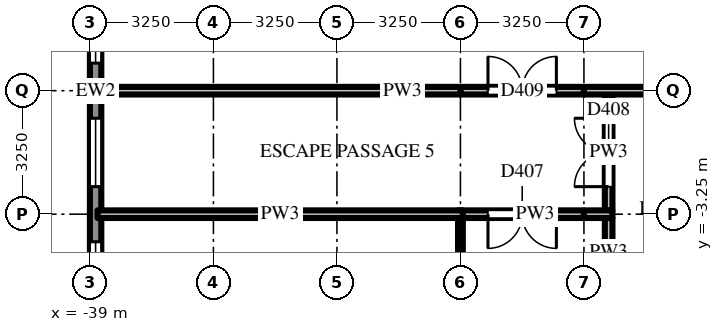
"""IFC4 building model, lengths in metres.
Left out: names, types, materials, properties, quantities, classifications, styles, units other than length and angle.
Written with IfcOpenShell. Run it as: python <this file> out.ifc"""

import sys

from ifc_helpers import new_model, si_unit, direction, frame, frame_2d, origin, place, context, subcontext, project, spatial, rectangle, extrude, source, transform, mapped, element, fill, save


model = new_model("IFC4")
c1 = context("Model", 3, precision=1e-05, world=origin(), true_north=direction((0.0, 1.0)))
c2 = subcontext(c1, "Body", "Model", "MODEL_VIEW")
j1 = project(units=[si_unit("LENGTHUNIT", "METRE"), si_unit("PLANEANGLEUNIT", "RADIAN")], contexts=[c1])
p1 = place(None, origin())
s1 = spatial("IfcSite", under=j1, at=p1, CompositionType="ELEMENT")
p2 = place(p1, origin())
s2 = spatial("IfcBuilding", under=s1, at=p2, CompositionType="ELEMENT")
p3 = place(p2, frame((0.0, 0.0, 14.0)))
s3 = spatial("IfcBuildingStorey", under=s2, at=p3, CompositionType="ELEMENT", Elevation=14.0)
m1 = source(origin(), c2, "Body", "SweptSolid", [
    extrude(rectangle(XDim=71.5, YDim=0.3, at=frame_2d((35.75, 0.0))), origin(), (0.0, 0.0, 1.0), 4.7),
])
p4 = place(p3, frame((-38.85, 35.75, 0.0), z_axis=(0.0, 0.0, 1.0), x_axis=(0.0, -1.0, 0.0)))
e1 = element("IfcWall", 1, at=p4, inside=s3, PredefinedType="SOLIDWALL", context=c2, shape_type="MappedRepresentation", body=[
    mapped(m1, transform((0.0, 0.0, 0.0))),
])
m2 = source(origin(), c2, "Body", "SweptSolid", [
    extrude(rectangle(XDim=1.8, YDim=3.0, at=frame_2d((0.9, 1.5))), frame((0.0, 0.16, 0.0), z_axis=(0.0, -1.0, 0.0), x_axis=(1.0, 0.0, 0.0)), (0.0, 0.0, 1.0), 0.32),
])
p5 = place(p4, frame((0.725, 0.0, 0.9)))
e2 = element("IfcOpeningElement", 2, at=p5, cuts=e1, PredefinedType="OPENING", context=c2, shape_type="MappedRepresentation", body=[
    mapped(m2, transform((0.0, 0.0, 0.0))),
])
p6 = place(p4, frame((3.975, 0.0, 0.9)))
e3 = element("IfcOpeningElement", 3, at=p6, cuts=e1, PredefinedType="OPENING", context=c2, shape_type="MappedRepresentation", body=[
    mapped(m2, transform((0.0, 0.0, 0.0))),
])
p7 = place(p4, frame((7.225, 0.0, 0.9)))
e4 = element("IfcOpeningElement", 4, at=p7, cuts=e1, PredefinedType="OPENING", context=c2, shape_type="MappedRepresentation", body=[
    mapped(m2, transform((0.0, 0.0, 0.0))),
])
p8 = place(p4, frame((10.475, 0.0, 0.9)))
e5 = element("IfcOpeningElement", 5, at=p8, cuts=e1, PredefinedType="OPENING", context=c2, shape_type="MappedRepresentation", body=[
    mapped(m2, transform((0.0, 0.0, 0.0))),
])
p9 = place(p4, frame((13.725, 0.0, 0.9)))
e6 = element("IfcOpeningElement", 6, at=p9, cuts=e1, PredefinedType="OPENING", context=c2, shape_type="MappedRepresentation", body=[
    mapped(m2, transform((0.0, 0.0, 0.0))),
])
p10 = place(p4, frame((16.975, 0.0, 0.9)))
e7 = element("IfcOpeningElement", 7, at=p10, cuts=e1, PredefinedType="OPENING", context=c2, shape_type="MappedRepresentation", body=[
    mapped(m2, transform((0.0, 0.0, 0.0))),
])
p11 = place(p4, frame((20.225, 0.0, 0.9)))
e8 = element("IfcOpeningElement", 8, at=p11, cuts=e1, PredefinedType="OPENING", context=c2, shape_type="MappedRepresentation", body=[
    mapped(m2, transform((0.0, 0.0, 0.0))),
])
p12 = place(p4, frame((23.475, 0.0, 0.9)))
e9 = element("IfcOpeningElement", 9, at=p12, cuts=e1, PredefinedType="OPENING", context=c2, shape_type="MappedRepresentation", body=[
    mapped(m2, transform((0.0, 0.0, 0.0))),
])
p13 = place(p4, frame((26.725, 0.0, 0.9)))
e10 = element("IfcOpeningElement", 10, at=p13, cuts=e1, PredefinedType="OPENING", context=c2, shape_type="MappedRepresentation", body=[
    mapped(m2, transform((0.0, 0.0, 0.0))),
])
p14 = place(p4, frame((29.975, 0.0, 0.9)))
e11 = element("IfcOpeningElement", 11, at=p14, cuts=e1, PredefinedType="OPENING", context=c2, shape_type="MappedRepresentation", body=[
    mapped(m2, transform((0.0, 0.0, 0.0))),
])
p15 = place(p4, frame((33.225, 0.0, 0.9)))
e12 = element("IfcOpeningElement", 12, at=p15, cuts=e1, PredefinedType="OPENING", context=c2, shape_type="MappedRepresentation", body=[
    mapped(m2, transform((0.0, 0.0, 0.0))),
])
p16 = place(p4, frame((36.475, 0.0, 0.9)))
e13 = element("IfcOpeningElement", 13, at=p16, cuts=e1, PredefinedType="OPENING", context=c2, shape_type="MappedRepresentation", body=[
    mapped(m2, transform((0.0, 0.0, 0.0))),
])
p17 = place(p4, frame((39.725, 0.0, 0.9)))
e14 = element("IfcOpeningElement", 14, at=p17, cuts=e1, PredefinedType="OPENING", context=c2, shape_type="MappedRepresentation", body=[
    mapped(m2, transform((0.0, 0.0, 0.0))),
])
p18 = place(p4, frame((42.975, 0.0, 0.9)))
e15 = element("IfcOpeningElement", 15, at=p18, cuts=e1, PredefinedType="OPENING", context=c2, shape_type="MappedRepresentation", body=[
    mapped(m2, transform((0.0, 0.0, 0.0))),
])
p19 = place(p4, frame((46.225, 0.0, 0.9)))
e16 = element("IfcOpeningElement", 16, at=p19, cuts=e1, PredefinedType="OPENING", context=c2, shape_type="MappedRepresentation", body=[
    mapped(m2, transform((0.0, 0.0, 0.0))),
])
m3 = source(origin(), c2, "Body", "SweptSolid", [
    extrude(rectangle(XDim=1.8, YDim=2.4, at=frame_2d((0.9, 1.2))), frame((0.0, 0.16, 0.0), z_axis=(0.0, -1.0, 0.0), x_axis=(1.0, 0.0, 0.0)), (0.0, 0.0, 1.0), 0.32),
])
p20 = place(p4, frame((49.475, 0.0, 0.0)))
e17 = element("IfcOpeningElement", 17, at=p20, cuts=e1, PredefinedType="OPENING", context=c2, shape_type="MappedRepresentation", body=[
    mapped(m3, transform((0.0, 0.0, 0.0))),
])
p21 = place(p4, frame((52.725, 0.0, 0.9)))
e18 = element("IfcOpeningElement", 18, at=p21, cuts=e1, PredefinedType="OPENING", context=c2, shape_type="MappedRepresentation", body=[
    mapped(m2, transform((0.0, 0.0, 0.0))),
])
p22 = place(p4, frame((55.975, 0.0, 0.9)))
e19 = element("IfcOpeningElement", 19, at=p22, cuts=e1, PredefinedType="OPENING", context=c2, shape_type="MappedRepresentation", body=[
    mapped(m2, transform((0.0, 0.0, 0.0))),
])
p23 = place(p4, frame((59.225, 0.0, 0.9)))
e20 = element("IfcOpeningElement", 20, at=p23, cuts=e1, PredefinedType="OPENING", context=c2, shape_type="MappedRepresentation", body=[
    mapped(m2, transform((0.0, 0.0, 0.0))),
])
p24 = place(p4, frame((62.475, 0.0, 0.9)))
e21 = element("IfcOpeningElement", 21, at=p24, cuts=e1, PredefinedType="OPENING", context=c2, shape_type="MappedRepresentation", body=[
    mapped(m2, transform((0.0, 0.0, 0.0))),
])
p25 = place(p4, frame((65.725, 0.0, 0.9)))
e22 = element("IfcOpeningElement", 22, at=p25, cuts=e1, PredefinedType="OPENING", context=c2, shape_type="MappedRepresentation", body=[
    mapped(m2, transform((0.0, 0.0, 0.0))),
])
p26 = place(p4, frame((68.975, 0.0, 0.9)))
e23 = element("IfcOpeningElement", 23, at=p26, cuts=e1, PredefinedType="OPENING", context=c2, shape_type="MappedRepresentation", body=[
    mapped(m2, transform((0.0, 0.0, 0.0))),
])
p27 = place(p3, frame((-29.25, -29.15, 0.0), z_axis=(0.0, 0.0, 1.0), x_axis=(0.0, 1.0, 0.0)))
e24 = element("IfcWall", 24, at=p27, inside=s3, PredefinedType="PARTITIONING", context=c2, shape_type="SweptSolid", body=[
    extrude(rectangle(XDim=25.8, YDim=0.125, at=frame_2d((12.9, 0.0))), origin(), (0.0, 0.0, 1.0), 3.762),
])
m4 = source(origin(), c2, "Body", "SweptSolid", [
    extrude(rectangle(XDim=1.8, YDim=2.1, at=frame_2d((0.9, 1.05))), frame((0.0, 0.073, 0.0), z_axis=(0.0, -1.0, 0.0), x_axis=(1.0, 0.0, 0.0)), (0.0, 0.0, 1.0), 0.145),
])
p28 = place(p27, frame((0.25, 0.0, 0.0)))
e25 = element("IfcOpeningElement", 25, at=p28, cuts=e24, PredefinedType="OPENING", context=c2, shape_type="MappedRepresentation", body=[
    mapped(m4, transform((0.0, 0.0, 0.0))),
])
m5 = source(origin(), c2, "Body", "SweptSolid", [
    extrude(rectangle(XDim=3.05, YDim=0.2, at=frame_2d((1.525, 0.0))), origin(), (0.0, 0.0, 1.0), 4.077),
])
p29 = place(p3, frame((-25.35, -3.15, 0.0), z_axis=(0.0, 0.0, 1.0), x_axis=(0.0, 1.0, 0.0)))
e26 = element("IfcWall", 26, at=p29, inside=s3, PredefinedType="PARTITIONING", context=c2, shape_type="MappedRepresentation", body=[
    mapped(m5, transform((0.0, 0.0, 0.0))),
])
m6 = source(origin(), c2, "Body", "SweptSolid", [
    extrude(rectangle(XDim=1.8, YDim=2.1, at=frame_2d((0.9, 1.05))), frame((0.0, 0.11, 0.0), z_axis=(0.0, -1.0, 0.0), x_axis=(1.0, 0.0, 0.0)), (0.0, 0.0, 1.0), 0.22),
])
p30 = place(p29, frame((0.625, 0.0, 0.0)))
e27 = element("IfcOpeningElement", 27, at=p30, cuts=e26, PredefinedType="OPENING", context=c2, shape_type="MappedRepresentation", body=[
    mapped(m6, transform((0.0, 0.0, 0.0))),
])
m7 = source(origin(), c2, "Body", "SweptSolid", [
    extrude(rectangle(XDim=1.8, YDim=0.2, at=frame_2d((0.9, 0.0))), origin(), (0.0, 0.0, 1.0), 4.7),
])
p31 = place(p3, frame((-25.35, -3.35, 0.0), z_axis=(0.0, 0.0, 1.0), x_axis=(0.0, -1.0, 0.0)))
e28 = element("IfcWall", 28, at=p31, inside=s3, PredefinedType="PARTITIONING", context=c2, shape_type="MappedRepresentation", body=[
    mapped(m7, transform((0.0, 0.0, 0.0))),
])
m8 = source(origin(), c2, "Body", "SweptSolid", [
    extrude(rectangle(XDim=3.312, YDim=0.2, at=frame_2d((1.656, 0.0))), origin(), (0.0, 0.0, 1.0), 4.7),
])
p32 = place(p3, frame((-26.0, -3.25, 0.0), z_axis=(0.0, 0.0, 1.0), x_axis=(-1.0, 0.0, 0.0)))
e29 = element("IfcWall", 29, at=p32, inside=s3, PredefinedType="PARTITIONING", context=c2, shape_type="MappedRepresentation", body=[
    mapped(m8, transform((0.0, 0.0, 0.0))),
])
p33 = place(p32, frame((0.725, 0.0, 0.0)))
e30 = element("IfcOpeningElement", 30, at=p33, cuts=e29, PredefinedType="OPENING", context=c2, shape_type="MappedRepresentation", body=[
    mapped(m6, transform((0.0, 0.0, 0.0))),
])
m9 = source(origin(), c2, "Body", "SweptSolid", [
    extrude(rectangle(XDim=9.613, YDim=0.2, at=frame_2d((4.806, 0.0))), origin(), (0.0, 0.0, 1.0), 3.918),
])
p34 = place(p3, frame((-29.188, -3.25, 0.0), z_axis=(0.0, 0.0, 1.0), x_axis=(-1.0, 0.0, 0.0)))
e31 = element("IfcWall", 31, at=p34, inside=s3, PredefinedType="PARTITIONING", context=c2, shape_type="MappedRepresentation", body=[
    mapped(m9, transform((0.0, 0.0, 0.0))),
])
m10 = source(origin(), c2, "Body", "SweptSolid", [
    extrude(rectangle(XDim=0.75, YDim=0.2, at=frame_2d((0.375, 0.0))), origin(), (0.0, 0.0, 1.0), 4.7),
])
p35 = place(p3, frame((-25.25, -3.25, 0.0), z_axis=(0.0, 0.0, 1.0), x_axis=(-1.0, 0.0, 0.0)))
e32 = element("IfcWall", 32, at=p35, inside=s3, PredefinedType="PARTITIONING", context=c2, shape_type="MappedRepresentation", body=[
    mapped(m10, transform((0.0, 0.0, 0.0))),
])
m11 = source(origin(), c2, "Body", "SweptSolid", [
    extrude(rectangle(XDim=3.25, YDim=0.2, at=frame_2d((1.625, 0.0))), origin(), (0.0, 0.0, 1.0), 4.077),
])
p36 = place(p3, frame((-29.25, 0.0, 0.0), z_axis=(0.0, 0.0, 1.0), x_axis=(1.0, 0.0, 0.0)))
e33 = element("IfcWall", 33, at=p36, inside=s3, PredefinedType="PARTITIONING", context=c2, shape_type="MappedRepresentation", body=[
    mapped(m11, transform((0.0, 0.0, 0.0))),
])
p37 = place(p36, frame((0.725, 0.0, 0.0)))
e34 = element("IfcOpeningElement", 34, at=p37, cuts=e33, PredefinedType="OPENING", context=c2, shape_type="MappedRepresentation", body=[
    mapped(m6, transform((0.0, 0.0, 0.0))),
])
m12 = source(origin(), c2, "Body", "SweptSolid", [
    extrude(rectangle(XDim=9.55, YDim=0.2, at=frame_2d((4.775, 0.0))), origin(), (0.0, 0.0, 1.0), 3.918),
])
p38 = place(p3, frame((-38.8, 0.0, 0.0), z_axis=(0.0, 0.0, 1.0), x_axis=(1.0, 0.0, 0.0)))
e35 = element("IfcWall", 35, at=p38, inside=s3, PredefinedType="PARTITIONING", context=c2, shape_type="MappedRepresentation", body=[
    mapped(m12, transform((0.0, 0.0, 0.0))),
])
m13 = source(origin(), c2, "Body", "SweptSolid", [
    extrude(rectangle(XDim=2.0, YDim=0.2, at=frame_2d((1.0, 0.0))), origin(), (0.0, 0.0, 1.0), 4.077),
])
p39 = place(p3, frame((-26.0, 0.0, 0.0), z_axis=(0.0, 0.0, 1.0), x_axis=(1.0, 0.0, 0.0)))
e36 = element("IfcWall", 36, at=p39, inside=s3, PredefinedType="PARTITIONING", context=c2, shape_type="MappedRepresentation", body=[
    mapped(m13, transform((0.0, 0.0, 0.0))),
])
m14 = source(origin(), c2, "Body", "SweptSolid", [
    extrude(rectangle(XDim=1.8, YDim=3.0, at=frame_2d((0.9, 1.5))), frame((0.0, 0.03, 0.0), z_axis=(0.0, -1.0, 0.0), x_axis=(1.0, 0.0, 0.0)), (0.0, 0.0, 1.0), 0.06),
])
p40 = place(p15, origin())
e37 = element("IfcWindow", 37, at=p40, inside=s3, PartitioningType="SINGLE_PANEL", PredefinedType="WINDOW", context=c2, shape_type="MappedRepresentation", body=[
    mapped(m14, transform((0.0, 0.0, 0.0))),
])
fill(e12, e37)
p41 = place(p16, origin())
e38 = element("IfcWindow", 38, at=p41, inside=s3, PartitioningType="SINGLE_PANEL", PredefinedType="WINDOW", context=c2, shape_type="MappedRepresentation", body=[
    mapped(m14, transform((0.0, 0.0, 0.0))),
])
fill(e13, e38)
p42 = place(p17, origin())
e39 = element("IfcWindow", 39, at=p42, inside=s3, PartitioningType="SINGLE_PANEL", PredefinedType="WINDOW", context=c2, shape_type="MappedRepresentation", body=[
    mapped(m14, transform((0.0, 0.0, 0.0))),
])
fill(e14, e39)
m15 = source(origin(), c2, "Body", "SweptSolid", [
    extrude(rectangle(XDim=1.8, YDim=2.1, at=frame_2d((0.9, 1.05))), frame((0.0, 0.025, 0.0), z_axis=(0.0, -1.0, 0.0), x_axis=(1.0, 0.0, 0.0)), (0.0, 0.0, 1.0), 0.05),
])
p43 = place(p33, origin())
e40 = element("IfcDoor", 40, at=p43, inside=s3, OperationType="DOUBLE_DOOR_SINGLE_SWING", PredefinedType="DOOR", context=c2, shape_type="MappedRepresentation", body=[
    mapped(m15, transform((0.0, 0.0, 0.0))),
])
fill(e30, e40)
p44 = place(p30, origin())
e41 = element("IfcDoor", 41, at=p44, inside=s3, OperationType="DOUBLE_DOOR_SINGLE_SWING", PredefinedType="DOOR", context=c2, shape_type="MappedRepresentation", body=[
    mapped(m15, transform((0.0, 0.0, 0.0))),
])
fill(e27, e41)
p45 = place(p37, origin())
e42 = element("IfcDoor", 42, at=p45, inside=s3, OperationType="DOUBLE_DOOR_SINGLE_SWING", PredefinedType="DOOR", context=c2, shape_type="MappedRepresentation", body=[
    mapped(m15, transform((0.0, 0.0, 0.0))),
])
fill(e34, e42)
save(model, sys.argv[1])
